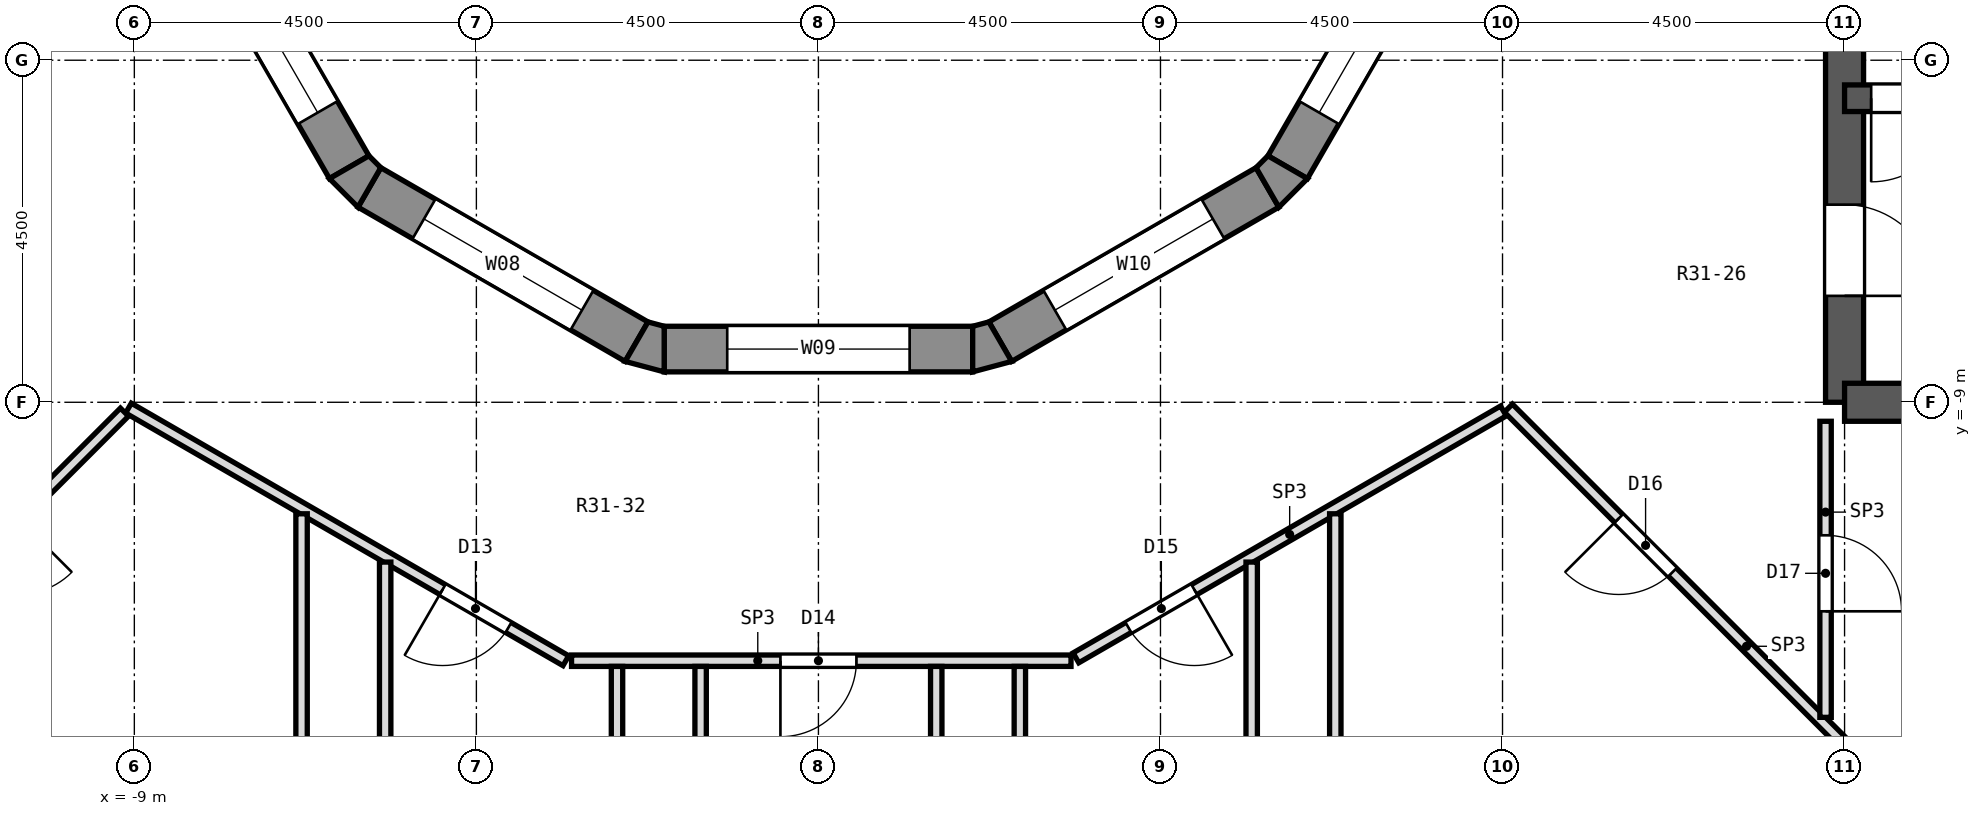
"""IFC4 building model, lengths in metres.
Left out: names, types, materials, properties, quantities, classifications, styles, units other than length and angle.
Written with IfcOpenShell. Run it as: python <this file> out.ifc"""

import sys

from ifc_helpers import new_model, si_unit, direction, frame, frame_2d, origin, place, context, subcontext, project, spatial, polyline, rectangle, outline, extrude, element, fill, save


model = new_model("IFC4")
c1 = context("Model", 3, precision=1e-05, world=origin(), true_north=direction((0.0, 1.0)))
c2 = subcontext(c1, "Body", "Model", "MODEL_VIEW")
j1 = project(units=[si_unit("LENGTHUNIT", "METRE"), si_unit("PLANEANGLEUNIT", "RADIAN")], contexts=[c1])
p1 = place(None, origin())
s1 = spatial("IfcSite", under=j1, at=p1, CompositionType="ELEMENT")
p2 = place(p1, origin())
s2 = spatial("IfcBuilding", under=s1, at=p2, CompositionType="ELEMENT")
p3 = place(p2, frame((0.0, 0.0, 220.2)))
s3 = spatial("IfcBuildingStorey", under=s2, at=p3, CompositionType="ELEMENT", Elevation=220.2)
p4 = place(p3, frame((13.5, -9.0, 0.0), z_axis=(0.0, 0.0, 1.0), x_axis=(0.0, 1.0, 0.0)))
e1 = element("IfcWall", 1, at=p4, inside=s3, PredefinedType="SHEAR", context=c2, shape_type="SweptSolid", body=[
    extrude(rectangle(XDim=18.0, YDim=0.5, at=frame_2d((9.0, 0.0))), origin(), (0.0, 0.0, 1.0), 4.5),
])
p5 = place(p4, frame((15.4, 0.0, 0.0)))
e2 = element("IfcOpeningElement", 2, at=p5, cuts=e1, PredefinedType="OPENING", context=c2, shape_type="SweptSolid", body=[
    extrude(rectangle(XDim=1.2, YDim=2.1, at=frame_2d((0.6, 1.05))), frame((0.0, 0.262, 0.0), z_axis=(0.0, -1.0, 0.0), x_axis=(1.0, 0.0, 0.0)), (0.0, 0.0, 1.0), 0.524),
])
p6 = place(p4, frame((1.4, 0.0, 0.0)))
e3 = element("IfcOpeningElement", 3, at=p6, cuts=e1, PredefinedType="OPENING", context=c2, shape_type="SweptSolid", body=[
    extrude(rectangle(XDim=1.2, YDim=2.1, at=frame_2d((0.6, 1.05))), frame((0.0, 0.262, 0.0), z_axis=(0.0, -1.0, 0.0), x_axis=(1.0, 0.0, 0.0)), (0.0, 0.0, 1.0), 0.524),
])
p7 = place(p4, frame((7.5, 0.0, 0.0)))
e4 = element("IfcOpeningElement", 4, at=p7, cuts=e1, PredefinedType="OPENING", context=c2, shape_type="SweptSolid", body=[
    extrude(rectangle(XDim=3.0, YDim=2.4, at=frame_2d((1.5, 1.2))), frame((0.0, 0.262, 0.0), z_axis=(0.0, -1.0, 0.0), x_axis=(1.0, 0.0, 0.0)), (0.0, 0.0, 1.0), 0.524),
])
p8 = place(p3, frame((13.5, -9.0, 0.0), z_axis=(0.0, 0.0, 1.0), x_axis=(1.0, 0.0, 0.0)))
e5 = element("IfcWall", 5, at=p8, inside=s3, PredefinedType="SHEAR", context=c2, shape_type="SweptSolid", body=[
    extrude(rectangle(XDim=6.0, YDim=0.5, at=frame_2d((3.0, 0.0))), origin(), (0.0, 0.0, 1.0), 4.5),
])
p9 = place(p3, frame((13.5, -5.0, 0.0), z_axis=(0.0, 0.0, 1.0), x_axis=(1.0, 0.0, 0.0)))
e6 = element("IfcWall", 6, at=p9, inside=s3, PredefinedType="SHEAR", context=c2, shape_type="SweptSolid", body=[
    extrude(rectangle(XDim=6.0, YDim=0.35, at=frame_2d((3.0, 0.0))), origin(), (0.0, 0.0, 1.0), 4.5),
])
p10 = place(p9, frame((0.35, 0.0, 0.0)))
e7 = element("IfcOpeningElement", 7, at=p10, cuts=e6, PredefinedType="OPENING", context=c2, shape_type="SweptSolid", body=[
    extrude(rectangle(XDim=1.1, YDim=2.1, at=frame_2d((0.55, 1.05))), frame((0.0, 0.187, 0.0), z_axis=(0.0, -1.0, 0.0), x_axis=(1.0, 0.0, 0.0)), (0.0, 0.0, 1.0), 0.374),
])
p11 = place(p3, frame((-8.203, -2.393, 0.0), z_axis=(0.0, 0.0, 1.0), x_axis=(0.499994954979, -0.866028316509, 0.0)))
e8 = element("IfcWall", 8, at=p11, inside=s3, PredefinedType="SOLIDWALL", context=c2, shape_type="SweptSolid", body=[
    extrude(rectangle(XDim=4.059, YDim=0.6, at=frame_2d((2.029, 0.0))), origin(), (0.0, 0.0, 1.0), 3.95),
])
p12 = place(p11, frame((0.829, 0.0, 1.5)))
e9 = element("IfcOpeningElement", 9, at=p12, cuts=e8, PredefinedType="OPENING", context=c2, shape_type="SweptSolid", body=[
    extrude(rectangle(XDim=2.4, YDim=2.0, at=frame_2d((1.2, 1.0))), frame((0.0, 0.312, 0.0), z_axis=(0.0, -1.0, 0.0), x_axis=(1.0, 0.0, 0.0)), (0.0, 0.0, 1.0), 0.624),
])
p13 = place(p3, frame((-5.907, -6.173, 0.0), z_axis=(0.0, 0.0, 1.0), x_axis=(0.866028316509, -0.499994954979, 0.0)))
e10 = element("IfcWall", 10, at=p13, inside=s3, PredefinedType="SOLIDWALL", context=c2, shape_type="SweptSolid", body=[
    extrude(rectangle(XDim=4.059, YDim=0.6, at=frame_2d((2.029, 0.0))), origin(), (0.0, 0.0, 1.0), 3.95),
])
p14 = place(p13, frame((0.829, 0.0, 1.5)))
e11 = element("IfcOpeningElement", 11, at=p14, cuts=e10, PredefinedType="OPENING", context=c2, shape_type="SweptSolid", body=[
    extrude(rectangle(XDim=2.4, YDim=2.0, at=frame_2d((1.2, 1.0))), frame((0.0, 0.312, 0.0), z_axis=(0.0, -1.0, 0.0), x_axis=(1.0, 0.0, 0.0)), (0.0, 0.0, 1.0), 0.624),
])
p15 = place(p3, frame((-2.029, -8.3, 0.0), z_axis=(0.0, 0.0, 1.0), x_axis=(1.0, 0.0, 0.0)))
e12 = element("IfcWall", 12, at=p15, inside=s3, PredefinedType="SOLIDWALL", context=c2, shape_type="SweptSolid", body=[
    extrude(rectangle(XDim=4.059, YDim=0.6, at=frame_2d((2.029, 0.0))), origin(), (0.0, 0.0, 1.0), 3.95),
])
p16 = place(p15, frame((0.829, 0.0, 1.5)))
e13 = element("IfcOpeningElement", 13, at=p16, cuts=e12, PredefinedType="OPENING", context=c2, shape_type="SweptSolid", body=[
    extrude(rectangle(XDim=2.4, YDim=2.0, at=frame_2d((1.2, 1.0))), frame((0.0, 0.312, 0.0), z_axis=(0.0, -1.0, 0.0), x_axis=(1.0, 0.0, 0.0)), (0.0, 0.0, 1.0), 0.624),
])
p17 = place(p3, frame((2.393, -8.203, 0.0), z_axis=(0.0, 0.0, 1.0), x_axis=(0.866028316509, 0.499994954979, 0.0)))
e14 = element("IfcWall", 14, at=p17, inside=s3, PredefinedType="SOLIDWALL", context=c2, shape_type="SweptSolid", body=[
    extrude(rectangle(XDim=4.059, YDim=0.6, at=frame_2d((2.029, 0.0))), origin(), (0.0, 0.0, 1.0), 3.95),
])
p18 = place(p17, frame((0.829, 0.0, 1.5)))
e15 = element("IfcOpeningElement", 15, at=p18, cuts=e14, PredefinedType="OPENING", context=c2, shape_type="SweptSolid", body=[
    extrude(rectangle(XDim=2.4, YDim=2.0, at=frame_2d((1.2, 1.0))), frame((0.0, 0.312, 0.0), z_axis=(0.0, -1.0, 0.0), x_axis=(1.0, 0.0, 0.0)), (0.0, 0.0, 1.0), 0.624),
])
p19 = place(p3, frame((6.173, -5.907, 0.0), z_axis=(0.0, 0.0, 1.0), x_axis=(0.499994954979, 0.866028316509, 0.0)))
e16 = element("IfcWall", 16, at=p19, inside=s3, PredefinedType="SOLIDWALL", context=c2, shape_type="SweptSolid", body=[
    extrude(rectangle(XDim=4.059, YDim=0.6, at=frame_2d((2.029, 0.0))), origin(), (0.0, 0.0, 1.0), 3.95),
])
p20 = place(p19, frame((0.829, 0.0, 1.5)))
e17 = element("IfcOpeningElement", 17, at=p20, cuts=e16, PredefinedType="OPENING", context=c2, shape_type="SweptSolid", body=[
    extrude(rectangle(XDim=2.4, YDim=2.0, at=frame_2d((1.2, 1.0))), frame((0.0, 0.312, 0.0), z_axis=(0.0, -1.0, 0.0), x_axis=(1.0, 0.0, 0.0)), (0.0, 0.0, 1.0), 0.624),
])
p21 = place(p3, origin())
e18 = element("IfcWall", 18, at=p21, inside=s3, PredefinedType="SOLIDWALL", context=c2, shape_type="SweptSolid", body=[
    extrude(outline(polyline([(-6.058, -6.433), (-5.758, -5.914), (-5.914, -5.758), (-6.433, -6.058), (-6.058, -6.433)])), origin(), (0.0, 0.0, 1.0), 3.95),
])
p22 = place(p3, origin())
e19 = element("IfcWall", 19, at=p22, inside=s3, PredefinedType="SOLIDWALL", context=c2, shape_type="SweptSolid", body=[
    extrude(outline(polyline([(-2.029, -8.6), (-2.029, -8.0), (-2.242, -7.943), (-2.542, -8.462), (-2.029, -8.6)])), origin(), (0.0, 0.0, 1.0), 3.95),
])
p23 = place(p3, origin())
e20 = element("IfcWall", 20, at=p23, inside=s3, PredefinedType="SOLIDWALL", context=c2, shape_type="SweptSolid", body=[
    extrude(outline(polyline([(2.542, -8.462), (2.242, -7.943), (2.029, -8.0), (2.029, -8.6), (2.542, -8.462)])), origin(), (0.0, 0.0, 1.0), 3.95),
])
p24 = place(p3, origin())
e21 = element("IfcWall", 21, at=p24, inside=s3, PredefinedType="SOLIDWALL", context=c2, shape_type="SweptSolid", body=[
    extrude(outline(polyline([(6.433, -6.058), (5.914, -5.758), (5.758, -5.914), (6.058, -6.433), (6.433, -6.058)])), origin(), (0.0, 0.0, 1.0), 3.95),
])
p25 = place(p3, frame((9.077, -9.077, 0.0), z_axis=(0.0, 0.0, 1.0), x_axis=(0.707106781187, -0.707106781187, 0.0)))
e22 = element("IfcWall", 22, at=p25, inside=s3, PredefinedType="PARTITIONING", context=c2, shape_type="SweptSolid", body=[
    extrude(rectangle(XDim=8.863, YDim=0.15, at=frame_2d((4.432, 0.0))), origin(), (0.0, 0.0, 1.0), 3.95),
])
p26 = place(p25, frame((2.053, 0.0, 0.0)))
e23 = element("IfcOpeningElement", 23, at=p26, cuts=e22, PredefinedType="OPENING", context=c2, shape_type="SweptSolid", body=[
    extrude(rectangle(XDim=1.0, YDim=2.1, at=frame_2d((0.5, 1.05))), frame((0.0, 0.087, 0.0), z_axis=(0.0, -1.0, 0.0), x_axis=(1.0, 0.0, 0.0)), (0.0, 0.0, 1.0), 0.174),
])
p27 = place(p3, frame((-9.077, -9.077, 0.0), z_axis=(0.0, 0.0, 1.0), x_axis=(0.865961614908, -0.500110469302, 0.0)))
e24 = element("IfcWall", 24, at=p27, inside=s3, PredefinedType="PARTITIONING", context=c2, shape_type="SweptSolid", body=[
    extrude(rectangle(XDim=6.645, YDim=0.15, at=frame_2d((3.322, 0.0))), origin(), (0.0, 0.0, 1.0), 3.95),
])
p28 = place(p27, frame((4.772, 0.0, 0.0)))
e25 = element("IfcOpeningElement", 25, at=p28, cuts=e24, PredefinedType="OPENING", context=c2, shape_type="SweptSolid", body=[
    extrude(rectangle(XDim=1.0, YDim=2.1, at=frame_2d((0.5, 1.05))), frame((0.0, 0.087, 0.0), z_axis=(0.0, -1.0, 0.0), x_axis=(1.0, 0.0, 0.0)), (0.0, 0.0, 1.0), 0.174),
])
p29 = place(p3, frame((-3.248, -12.4, 0.0), z_axis=(0.0, 0.0, 1.0), x_axis=(1.0, 0.0, 0.0)))
e26 = element("IfcWall", 26, at=p29, inside=s3, PredefinedType="PARTITIONING", context=c2, shape_type="SweptSolid", body=[
    extrude(rectangle(XDim=6.571, YDim=0.15, at=frame_2d((3.286, 0.0))), origin(), (0.0, 0.0, 1.0), 3.95),
])
p30 = place(p29, frame((2.748, 0.0, 0.0)))
e27 = element("IfcOpeningElement", 27, at=p30, cuts=e26, PredefinedType="OPENING", context=c2, shape_type="SweptSolid", body=[
    extrude(rectangle(XDim=1.0, YDim=2.1, at=frame_2d((0.5, 1.05))), frame((0.0, 0.087, 0.0), z_axis=(0.0, -1.0, 0.0), x_axis=(1.0, 0.0, 0.0)), (0.0, 0.0, 1.0), 0.174),
])
p31 = place(p3, frame((3.388, -12.363, 0.0), z_axis=(0.0, 0.0, 1.0), x_axis=(0.865967095912, 0.5001009786, 0.0)))
e28 = element("IfcWall", 28, at=p31, inside=s3, PredefinedType="PARTITIONING", context=c2, shape_type="SweptSolid", body=[
    extrude(rectangle(XDim=6.495, YDim=0.15, at=frame_2d((3.248, 0.0))), origin(), (0.0, 0.0, 1.0), 3.95),
])
p32 = place(p31, frame((0.798, 0.0, 0.0)))
e29 = element("IfcOpeningElement", 29, at=p32, cuts=e28, PredefinedType="OPENING", context=c2, shape_type="SweptSolid", body=[
    extrude(rectangle(XDim=1.0, YDim=2.1, at=frame_2d((0.5, 1.05))), frame((0.0, 0.087, 0.0), z_axis=(0.0, -1.0, 0.0), x_axis=(1.0, 0.0, 0.0)), (0.0, 0.0, 1.0), 0.174),
])
p33 = place(p3, frame((-15.344, -15.344, 0.0), z_axis=(0.0, 0.0, 1.0), x_axis=(0.707106781187, 0.707106781187, 0.0)))
e30 = element("IfcWall", 30, at=p33, inside=s3, PredefinedType="PARTITIONING", context=c2, shape_type="SweptSolid", body=[
    extrude(rectangle(XDim=8.788, YDim=0.15, at=frame_2d((4.394, 0.0))), origin(), (0.0, 0.0, 1.0), 3.95),
])
p34 = place(p33, frame((5.81, 0.0, 0.0)))
e31 = element("IfcOpeningElement", 31, at=p34, cuts=e30, PredefinedType="OPENING", context=c2, shape_type="SweptSolid", body=[
    extrude(rectangle(XDim=1.0, YDim=2.1, at=frame_2d((0.5, 1.05))), frame((0.0, 0.087, 0.0), z_axis=(0.0, -1.0, 0.0), x_axis=(1.0, 0.0, 0.0)), (0.0, 0.0, 1.0), 0.174),
])
p35 = place(p3, frame((13.25, -13.145, 0.0), z_axis=(0.0, 0.0, 1.0), x_axis=(0.0, 1.0, 0.0)))
e32 = element("IfcWall", 32, at=p35, inside=s3, PredefinedType="PARTITIONING", context=c2, shape_type="SweptSolid", body=[
    extrude(rectangle(XDim=3.895, YDim=0.15, at=frame_2d((1.948, 0.0))), origin(), (0.0, 0.0, 1.0), 3.95),
])
p36 = place(p35, frame((1.395, 0.0, 0.0)))
e33 = element("IfcOpeningElement", 33, at=p36, cuts=e32, PredefinedType="OPENING", context=c2, shape_type="SweptSolid", body=[
    extrude(rectangle(XDim=1.0, YDim=2.1, at=frame_2d((0.5, 1.05))), frame((0.0, 0.087, 0.0), z_axis=(0.0, -1.0, 0.0), x_axis=(1.0, 0.0, 0.0)), (0.0, 0.0, 1.0), 0.174),
])
p37 = place(p3, frame((6.8, -20.53, 0.0), z_axis=(0.0, 0.0, 1.0), x_axis=(0.0, 1.0, 0.0)))
e34 = element("IfcWall", 34, at=p37, inside=s3, PredefinedType="PARTITIONING", context=c2, shape_type="SweptSolid", body=[
    extrude(rectangle(XDim=10.063, YDim=0.15, at=frame_2d((5.031, 0.0))), origin(), (0.0, 0.0, 1.0), 3.95),
])
p38 = place(p3, frame((5.7, -20.93, 0.0), z_axis=(0.0, 0.0, 1.0), x_axis=(0.0, 1.0, 0.0)))
e35 = element("IfcWall", 35, at=p38, inside=s3, PredefinedType="PARTITIONING", context=c2, shape_type="SweptSolid", body=[
    extrude(rectangle(XDim=9.828, YDim=0.15, at=frame_2d((4.914, 0.0))), origin(), (0.0, 0.0, 1.0), 3.95),
])
p39 = place(p3, frame((2.65, -21.483, 0.0), z_axis=(0.0, 0.0, 1.0), x_axis=(0.0, 1.0, 0.0)))
e36 = element("IfcWall", 36, at=p39, inside=s3, PredefinedType="PARTITIONING", context=c2, shape_type="SweptSolid", body=[
    extrude(rectangle(XDim=9.008, YDim=0.15, at=frame_2d((4.504, 0.0))), origin(), (0.0, 0.0, 1.0), 3.95),
])
for number, where, z_axis, x_axis in (
    (37, (1.55, -21.617, 0.0), (0.0, 0.0, 1.0), (0.0, 1.0, 0.0)),
    (38, (-1.55, -21.617, 0.0), (0.0, 0.0, 1.0), (0.0, 1.0, 0.0)),
):
    element("IfcWall", number, at=place(p3, frame(where, z_axis=z_axis, x_axis=x_axis)), inside=s3, PredefinedType="PARTITIONING", context=c2, shape_type="SweptSolid", body=[
        extrude(rectangle(XDim=9.142, YDim=0.15, at=frame_2d((4.571, 0.0))), origin(), (0.0, 0.0, 1.0), 3.95),
    ])
p40 = place(p3, frame((-2.65, -21.483, 0.0), z_axis=(0.0, 0.0, 1.0), x_axis=(0.0, 1.0, 0.0)))
e39 = element("IfcWall", 39, at=p40, inside=s3, PredefinedType="PARTITIONING", context=c2, shape_type="SweptSolid", body=[
    extrude(rectangle(XDim=9.008, YDim=0.15, at=frame_2d((4.504, 0.0))), origin(), (0.0, 0.0, 1.0), 3.95),
])
p41 = place(p3, frame((-5.7, -20.93, 0.0), z_axis=(0.0, 0.0, 1.0), x_axis=(0.0, 1.0, 0.0)))
e40 = element("IfcWall", 40, at=p41, inside=s3, PredefinedType="PARTITIONING", context=c2, shape_type="SweptSolid", body=[
    extrude(rectangle(XDim=9.828, YDim=0.15, at=frame_2d((4.914, 0.0))), origin(), (0.0, 0.0, 1.0), 3.95),
])
p42 = place(p3, frame((-6.8, -20.53, 0.0), z_axis=(0.0, 0.0, 1.0), x_axis=(0.0, 1.0, 0.0)))
e41 = element("IfcWall", 41, at=p42, inside=s3, PredefinedType="PARTITIONING", context=c2, shape_type="SweptSolid", body=[
    extrude(rectangle(XDim=10.063, YDim=0.15, at=frame_2d((5.031, 0.0))), origin(), (0.0, 0.0, 1.0), 3.95),
])
p43 = place(p12, origin())
e42 = element("IfcWindow", 42, at=p43, inside=s3, PartitioningType="SINGLE_PANEL", PredefinedType="WINDOW", context=c2, shape_type="SweptSolid", body=[
    extrude(rectangle(XDim=2.4, YDim=2.0, at=frame_2d((1.2, 1.0))), frame((0.0, -0.12, 0.0), z_axis=(0.0, -1.0, 0.0), x_axis=(1.0, 0.0, 0.0)), (0.0, 0.0, 1.0), 0.06),
])
fill(e9, e42)
p44 = place(p14, origin())
e43 = element("IfcWindow", 43, at=p44, inside=s3, PartitioningType="SINGLE_PANEL", PredefinedType="WINDOW", context=c2, shape_type="SweptSolid", body=[
    extrude(rectangle(XDim=2.4, YDim=2.0, at=frame_2d((1.2, 1.0))), frame((0.0, -0.12, 0.0), z_axis=(0.0, -1.0, 0.0), x_axis=(1.0, 0.0, 0.0)), (0.0, 0.0, 1.0), 0.06),
])
fill(e11, e43)
p45 = place(p16, origin())
e44 = element("IfcWindow", 44, at=p45, inside=s3, PartitioningType="SINGLE_PANEL", PredefinedType="WINDOW", context=c2, shape_type="SweptSolid", body=[
    extrude(rectangle(XDim=2.4, YDim=2.0, at=frame_2d((1.2, 1.0))), frame((0.0, -0.12, 0.0), z_axis=(0.0, -1.0, 0.0), x_axis=(1.0, 0.0, 0.0)), (0.0, 0.0, 1.0), 0.06),
])
fill(e13, e44)
p46 = place(p18, origin())
e45 = element("IfcWindow", 45, at=p46, inside=s3, PartitioningType="SINGLE_PANEL", PredefinedType="WINDOW", context=c2, shape_type="SweptSolid", body=[
    extrude(rectangle(XDim=2.4, YDim=2.0, at=frame_2d((1.2, 1.0))), frame((0.0, -0.12, 0.0), z_axis=(0.0, -1.0, 0.0), x_axis=(1.0, 0.0, 0.0)), (0.0, 0.0, 1.0), 0.06),
])
fill(e15, e45)
p47 = place(p20, origin())
e46 = element("IfcWindow", 46, at=p47, inside=s3, PartitioningType="SINGLE_PANEL", PredefinedType="WINDOW", context=c2, shape_type="SweptSolid", body=[
    extrude(rectangle(XDim=2.4, YDim=2.0, at=frame_2d((1.2, 1.0))), frame((0.0, -0.12, 0.0), z_axis=(0.0, -1.0, 0.0), x_axis=(1.0, 0.0, 0.0)), (0.0, 0.0, 1.0), 0.06),
])
fill(e17, e46)
p48 = place(p28, frame((1.0, 0.0, 0.0), z_axis=(0.0, 0.0, 1.0), x_axis=(-1.0, 0.0, 0.0)))
e47 = element("IfcDoor", 47, at=p48, inside=s3, OperationType="SINGLE_SWING_RIGHT", PredefinedType="DOOR", context=c2, shape_type="SweptSolid", body=[
    extrude(rectangle(XDim=1.0, YDim=2.1, at=frame_2d((0.5, 1.05))), frame((0.0, 0.025, 0.0), z_axis=(0.0, -1.0, 0.0), x_axis=(1.0, 0.0, 0.0)), (0.0, 0.0, 1.0), 0.05),
])
fill(e25, e47)
p49 = place(p30, frame((1.0, 0.0, 0.0), z_axis=(0.0, 0.0, 1.0), x_axis=(-1.0, 0.0, 0.0)))
e48 = element("IfcDoor", 48, at=p49, inside=s3, OperationType="SINGLE_SWING_RIGHT", PredefinedType="DOOR", context=c2, shape_type="SweptSolid", body=[
    extrude(rectangle(XDim=1.0, YDim=2.1, at=frame_2d((0.5, 1.05))), frame((0.0, 0.025, 0.0), z_axis=(0.0, -1.0, 0.0), x_axis=(1.0, 0.0, 0.0)), (0.0, 0.0, 1.0), 0.05),
])
fill(e27, e48)
p50 = place(p32, frame((1.0, 0.0, 0.0), z_axis=(0.0, 0.0, 1.0), x_axis=(-1.0, 0.0, 0.0)))
e49 = element("IfcDoor", 49, at=p50, inside=s3, OperationType="SINGLE_SWING_LEFT", PredefinedType="DOOR", context=c2, shape_type="SweptSolid", body=[
    extrude(rectangle(XDim=1.0, YDim=2.1, at=frame_2d((0.5, 1.05))), frame((0.0, 0.025, 0.0), z_axis=(0.0, -1.0, 0.0), x_axis=(1.0, 0.0, 0.0)), (0.0, 0.0, 1.0), 0.05),
])
fill(e29, e49)
p51 = place(p26, frame((1.0, 0.0, 0.0), z_axis=(0.0, 0.0, 1.0), x_axis=(-1.0, 0.0, 0.0)))
e50 = element("IfcDoor", 50, at=p51, inside=s3, OperationType="SINGLE_SWING_RIGHT", PredefinedType="DOOR", context=c2, shape_type="SweptSolid", body=[
    extrude(rectangle(XDim=1.0, YDim=2.1, at=frame_2d((0.5, 1.05))), frame((0.0, 0.025, 0.0), z_axis=(0.0, -1.0, 0.0), x_axis=(1.0, 0.0, 0.0)), (0.0, 0.0, 1.0), 0.05),
])
fill(e23, e50)
p52 = place(p36, frame((1.0, 0.0, 0.0), z_axis=(0.0, 0.0, 1.0), x_axis=(-1.0, 0.0, 0.0)))
e51 = element("IfcDoor", 51, at=p52, inside=s3, OperationType="SINGLE_SWING_RIGHT", PredefinedType="DOOR", context=c2, shape_type="SweptSolid", body=[
    extrude(rectangle(XDim=1.0, YDim=2.1, at=frame_2d((0.5, 1.05))), frame((0.0, 0.025, 0.0), z_axis=(0.0, -1.0, 0.0), x_axis=(1.0, 0.0, 0.0)), (0.0, 0.0, 1.0), 0.05),
])
fill(e33, e51)
p53 = place(p10, frame((1.1, 0.0, 0.0), z_axis=(0.0, 0.0, 1.0), x_axis=(-1.0, 0.0, 0.0)))
e52 = element("IfcDoor", 52, at=p53, inside=s3, OperationType="SINGLE_SWING_RIGHT", PredefinedType="DOOR", context=c2, shape_type="SweptSolid", body=[
    extrude(rectangle(XDim=1.1, YDim=2.1, at=frame_2d((0.55, 1.05))), frame((0.0, 0.025, 0.0), z_axis=(0.0, -1.0, 0.0), x_axis=(1.0, 0.0, 0.0)), (0.0, 0.0, 1.0), 0.05),
])
fill(e7, e52)
p54 = place(p6, frame((1.2, 0.0, 0.0), z_axis=(0.0, 0.0, 1.0), x_axis=(-1.0, 0.0, 0.0)))
e53 = element("IfcDoor", 53, at=p54, inside=s3, OperationType="SINGLE_SWING_RIGHT", PredefinedType="DOOR", context=c2, shape_type="SweptSolid", body=[
    extrude(rectangle(XDim=1.2, YDim=2.1, at=frame_2d((0.6, 1.05))), frame((0.0, 0.025, 0.0), z_axis=(0.0, -1.0, 0.0), x_axis=(1.0, 0.0, 0.0)), (0.0, 0.0, 1.0), 0.05),
])
fill(e3, e53)
save(model, sys.argv[1])
